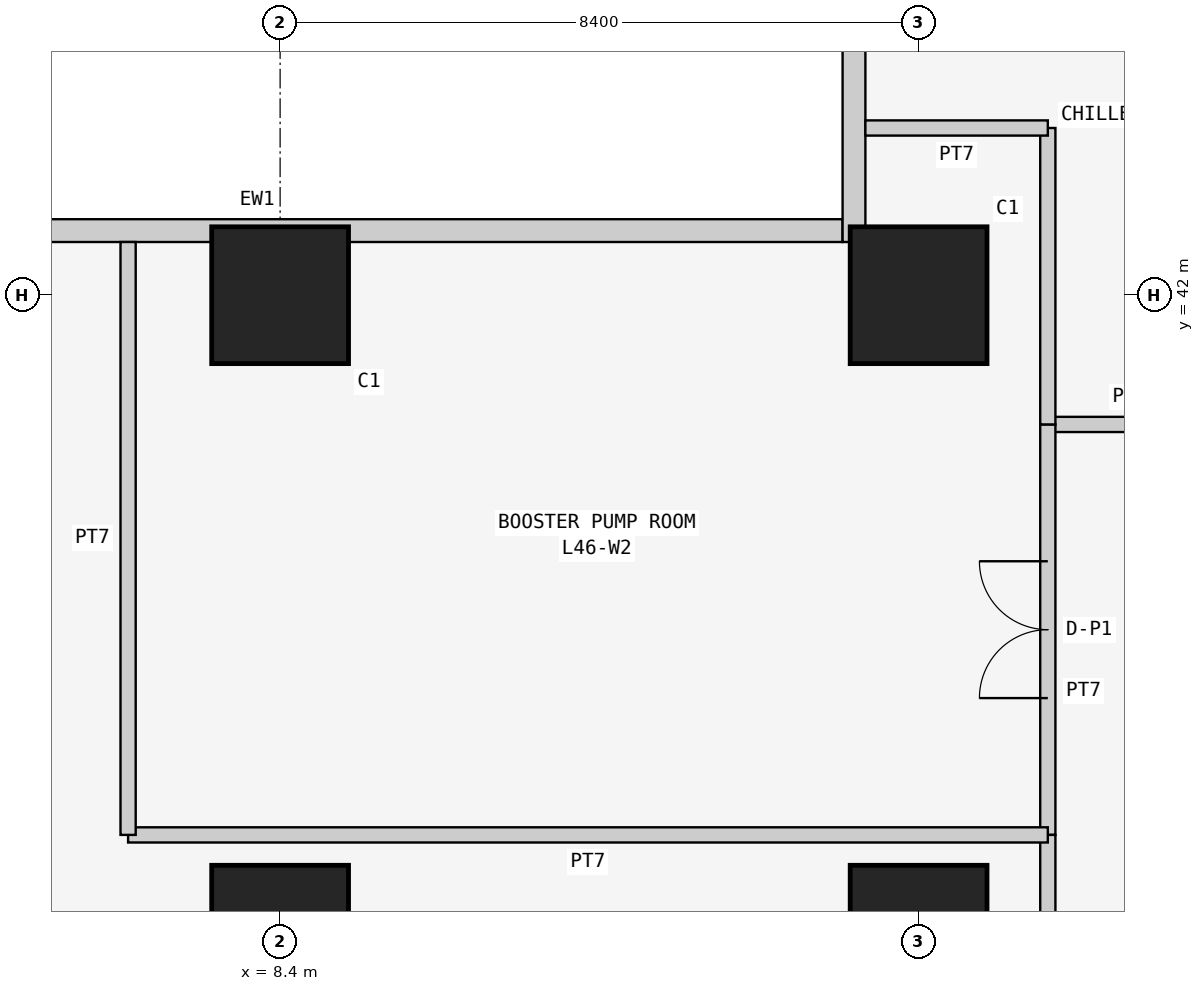
"""IFC4 building model, lengths in metres.
Left out: names, types, materials, properties, quantities, classifications, styles, units other than length and angle.
Written with IfcOpenShell. Run it as: python <this file> out.ifc"""

import sys

from ifc_helpers import new_model, si_unit, direction, frame, frame_2d, origin, origin_2d, place, context, subcontext, project, spatial, rectangle, extrude, element, fill, save


model = new_model("IFC4")
c1 = context("Model", 3, precision=1e-05, world=origin(), true_north=direction((0.0, 1.0)))
c2 = subcontext(c1, "Body", "Model", "MODEL_VIEW")
j1 = project(units=[si_unit("LENGTHUNIT", "METRE"), si_unit("PLANEANGLEUNIT", "RADIAN")], contexts=[c1])
p1 = place(None, origin())
s1 = spatial("IfcSite", under=j1, at=p1, CompositionType="ELEMENT")
p2 = place(p1, origin())
s2 = spatial("IfcBuilding", under=s1, at=p2, CompositionType="ELEMENT")
p3 = place(p2, frame((0.0, 0.0, 177.3)))
s3 = spatial("IfcBuildingStorey", under=s2, at=p3, CompositionType="ELEMENT", Elevation=177.3)
for number, where, z_axis, x_axis in (
    (1, (8.4, 33.6, 0.0), (0.0, 0.0, 1.0), (1.0, 0.0, 0.0)),
    (2, (8.4, 42.0, 0.0), (0.0, 0.0, 1.0), (1.0, 0.0, 0.0)),
    (3, (16.8, 33.6, 0.0), (0.0, 0.0, 1.0), (1.0, 0.0, 0.0)),
    (4, (16.8, 42.0, 0.0), (0.0, 0.0, 1.0), (1.0, 0.0, 0.0)),
):
    element("IfcColumn", number, at=place(p3, frame(where, z_axis=z_axis, x_axis=x_axis)), inside=s3, PredefinedType="COLUMN", context=c2, shape_type="SweptSolid", body=[
        extrude(rectangle(XDim=1.8, YDim=1.8, at=origin_2d()), origin(), (0.0, 0.0, 1.0), 6.0),
    ])
p4 = place(p3, frame((15.8, 42.85, 0.0), z_axis=(0.0, 0.0, 1.0), x_axis=(-1.0, 0.0, 0.0)))
e5 = element("IfcWall", 5, at=p4, inside=s3, PredefinedType="SOLIDWALL", context=c2, shape_type="SweptSolid", body=[
    extrude(rectangle(XDim=15.4, YDim=0.3, at=frame_2d((7.7, 0.0))), origin(), (0.0, 0.0, 1.0), 5.85),
])
p5 = place(p3, frame((15.95, 50.0, 0.0), z_axis=(0.0, 0.0, 1.0), x_axis=(0.0, -1.0, 0.0)))
e6 = element("IfcWall", 6, at=p5, inside=s3, PredefinedType="SOLIDWALL", context=c2, shape_type="SweptSolid", body=[
    extrude(rectangle(XDim=7.3, YDim=0.3, at=frame_2d((3.65, 0.0))), origin(), (0.0, 0.0, 1.0), 5.85),
])
p6 = place(p3, frame((18.5, 40.3, 0.0), z_axis=(0.0, 0.0, 1.0), x_axis=(1.0, 0.0, 0.0)))
e7 = element("IfcWall", 7, at=p6, inside=s3, PredefinedType="PARTITIONING", context=c2, shape_type="SweptSolid", body=[
    extrude(rectangle(XDim=5.4, YDim=0.2, at=frame_2d((2.7, 0.0))), origin(), (0.0, 0.0, 1.0), 5.85),
])
p7 = place(p6, frame((1.8, 0.0, 0.0)))
e8 = element("IfcOpeningElement", 8, at=p7, cuts=e7, PredefinedType="OPENING", context=c2, shape_type="SweptSolid", body=[
    extrude(rectangle(XDim=1.8, YDim=2.4, at=frame_2d((0.9, 1.2))), frame((0.0, 0.11, 0.0), z_axis=(0.0, -1.0, 0.0), x_axis=(1.0, 0.0, 0.0)), (0.0, 0.0, 1.0), 0.22),
])
p8 = place(p3, frame((18.5, 34.9, 0.0), z_axis=(0.0, 0.0, 1.0), x_axis=(0.0, 1.0, 0.0)))
e9 = element("IfcWall", 9, at=p8, inside=s3, PredefinedType="PARTITIONING", context=c2, shape_type="SweptSolid", body=[
    extrude(rectangle(XDim=5.4, YDim=0.2, at=frame_2d((2.7, 0.0))), origin(), (0.0, 0.0, 1.0), 5.85),
])
p9 = place(p8, frame((1.8, 0.0, 0.0)))
e10 = element("IfcOpeningElement", 10, at=p9, cuts=e9, PredefinedType="OPENING", context=c2, shape_type="SweptSolid", body=[
    extrude(rectangle(XDim=1.8, YDim=2.4, at=frame_2d((0.9, 1.2))), frame((0.0, 0.11, 0.0), z_axis=(0.0, -1.0, 0.0), x_axis=(1.0, 0.0, 0.0)), (0.0, 0.0, 1.0), 0.22),
])
p10 = place(p3, frame((18.5, 32.2, 0.0), z_axis=(0.0, 0.0, 1.0), x_axis=(0.0, 1.0, 0.0)))
e11 = element("IfcWall", 11, at=p10, inside=s3, PredefinedType="PARTITIONING", context=c2, shape_type="SweptSolid", body=[
    extrude(rectangle(XDim=2.7, YDim=0.2, at=frame_2d((1.35, 0.0))), origin(), (0.0, 0.0, 1.0), 5.85),
])
p11 = place(p3, frame((18.5, 40.3, 0.0), z_axis=(0.0, 0.0, 1.0), x_axis=(0.0, 1.0, 0.0)))
e12 = element("IfcWall", 12, at=p11, inside=s3, PredefinedType="PARTITIONING", context=c2, shape_type="SweptSolid", body=[
    extrude(rectangle(XDim=3.9, YDim=0.2, at=frame_2d((1.95, 0.0))), origin(), (0.0, 0.0, 1.0), 5.85),
])
p12 = place(p3, frame((18.5, 44.2, 0.0), z_axis=(0.0, 0.0, 1.0), x_axis=(-1.0, 0.0, 0.0)))
e13 = element("IfcWall", 13, at=p12, inside=s3, PredefinedType="PARTITIONING", context=c2, shape_type="SweptSolid", body=[
    extrude(rectangle(XDim=2.4, YDim=0.2, at=frame_2d((1.2, 0.0))), origin(), (0.0, 0.0, 1.0), 5.85),
])
p13 = place(p3, frame((18.5, 34.9, 0.0), z_axis=(0.0, 0.0, 1.0), x_axis=(-1.0, 0.0, 0.0)))
e14 = element("IfcWall", 14, at=p13, inside=s3, PredefinedType="PARTITIONING", context=c2, shape_type="SweptSolid", body=[
    extrude(rectangle(XDim=12.1, YDim=0.2, at=frame_2d((6.05, 0.0))), origin(), (0.0, 0.0, 1.0), 5.85),
])
p14 = place(p3, frame((6.4, 34.9, 0.0), z_axis=(0.0, 0.0, 1.0), x_axis=(0.0, 1.0, 0.0)))
e15 = element("IfcWall", 15, at=p14, inside=s3, PredefinedType="PARTITIONING", context=c2, shape_type="SweptSolid", body=[
    extrude(rectangle(XDim=7.8, YDim=0.2, at=frame_2d((3.9, 0.0))), origin(), (0.0, 0.0, 1.0), 5.85),
])
p15 = place(p9, origin())
e16 = element("IfcDoor", 16, at=p15, inside=s3, OperationType="DOUBLE_DOOR_SINGLE_SWING", PredefinedType="DOOR", context=c2, shape_type="SweptSolid", body=[
    extrude(rectangle(XDim=1.8, YDim=2.4, at=frame_2d((0.9, 1.2))), frame((0.0, 0.025, 0.0), z_axis=(0.0, -1.0, 0.0), x_axis=(1.0, 0.0, 0.0)), (0.0, 0.0, 1.0), 0.05),
])
fill(e10, e16)
save(model, sys.argv[1])
